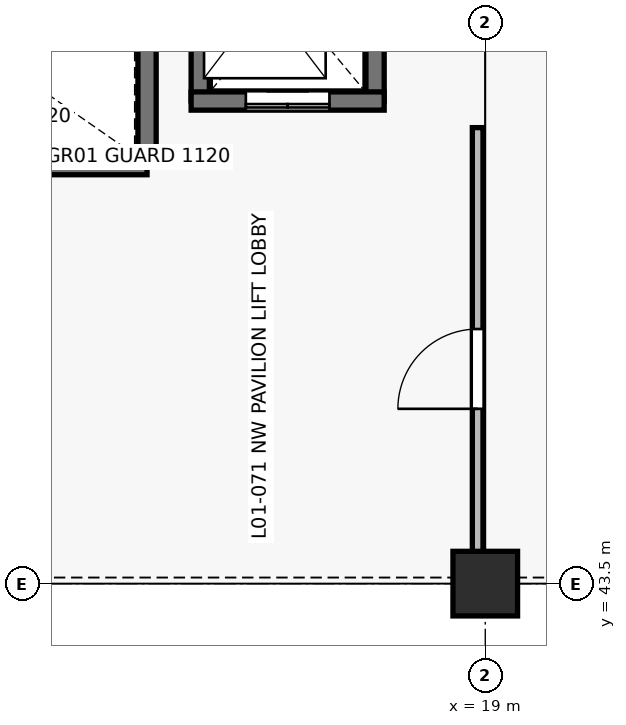
"""IFC4 building model, lengths in metres.
Left out: names, types, materials, properties, quantities, classifications, styles, units other than length and angle.
Written with IfcOpenShell. Run it as: python <this file> out.ifc"""

import sys

from ifc_helpers import new_model, si_unit, direction, frame, frame_2d, origin, origin_2d, place, context, subcontext, project, spatial, rectangle, extrude, element, fill, save


model = new_model("IFC4")
c1 = context("Model", 3, precision=1e-05, world=origin(), true_north=direction((0.0, 1.0)))
c2 = subcontext(c1, "Body", "Model", "MODEL_VIEW")
j1 = project(units=[si_unit("LENGTHUNIT", "METRE"), si_unit("PLANEANGLEUNIT", "RADIAN")], contexts=[c1])
p1 = place(None, origin())
s1 = spatial("IfcSite", under=j1, at=p1, CompositionType="ELEMENT")
p2 = place(p1, origin())
s2 = spatial("IfcBuilding", under=s1, at=p2, CompositionType="ELEMENT")
p3 = place(p2, frame((0.0, 0.0, 4.8)))
s3 = spatial("IfcBuildingStorey", under=s2, at=p3, CompositionType="ELEMENT", Elevation=4.8)
p4 = place(p3, frame((19.0, 43.5, 0.0), z_axis=(0.0, 0.0, 1.0), x_axis=(1.0, 0.0, 0.0)))
e1 = element("IfcColumn", 1, at=p4, inside=s3, PredefinedType="COLUMN", context=c2, shape_type="SweptSolid", body=[
    extrude(rectangle(XDim=0.85, YDim=0.85, at=origin_2d()), origin(), (0.0, 0.0, 1.0), 4.2),
])
for number, where, z_axis, x_axis in (
    (2, (15.25, 49.85, 0.0), (0.0, 0.0, 1.0), (0.0, 1.0, 0.0)),
    (3, (17.55, 52.55, 0.0), (0.0, 0.0, 1.0), (0.0, -1.0, 0.0)),
):
    element("IfcWall", number, at=place(p3, frame(where, z_axis=z_axis, x_axis=x_axis)), inside=s3, PredefinedType="SHEAR", context=c2, shape_type="SweptSolid", body=[
        extrude(rectangle(XDim=2.7, YDim=0.24, at=frame_2d((1.35, 0.0))), origin(), (0.0, 0.0, 1.0), 4.2),
    ])
p5 = place(p3, frame((17.67, 49.85, 0.0), z_axis=(0.0, 0.0, 1.0), x_axis=(-1.0, 0.0, 0.0)))
e4 = element("IfcWall", 4, at=p5, inside=s3, PredefinedType="SHEAR", context=c2, shape_type="SweptSolid", body=[
    extrude(rectangle(XDim=2.54, YDim=0.24, at=frame_2d((1.27, 0.0))), origin(), (0.0, 0.0, 1.0), 4.2),
])
p6 = place(p5, frame((0.72, 0.0, 0.0)))
e5 = element("IfcOpeningElement", 5, at=p6, cuts=e4, PredefinedType="OPENING", context=c2, shape_type="SweptSolid", body=[
    extrude(rectangle(XDim=1.1, YDim=2.15, at=frame_2d((0.55, 1.075))), frame((0.0, 0.13, 0.0), z_axis=(0.0, -1.0, 0.0), x_axis=(1.0, 0.0, 0.0)), (0.0, 0.0, 1.0), 0.26),
])
p7 = place(p3, frame((14.55, 49.0, 0.0), z_axis=(0.0, 0.0, 1.0), x_axis=(0.0, 1.0, 0.0)))
e6 = element("IfcWall", 6, at=p7, inside=s3, PredefinedType="SHEAR", context=c2, shape_type="SweptSolid", body=[
    extrude(rectangle(XDim=4.0, YDim=0.24, at=frame_2d((2.0, 0.0))), origin(), (0.0, 0.0, 1.0), 4.2),
])
p8 = place(p3, frame((7.45, 49.0, 0.0), z_axis=(0.0, 0.0, 1.0), x_axis=(1.0, 0.0, 0.0)))
e7 = element("IfcWall", 7, at=p8, inside=s3, PredefinedType="SHEAR", context=c2, shape_type="SweptSolid", body=[
    extrude(rectangle(XDim=7.1, YDim=0.24, at=frame_2d((3.55, 0.0))), origin(), (0.0, 0.0, 1.0), 4.2),
])
p9 = place(p8, frame((0.18, 0.0, 0.0)))
e8 = element("IfcOpeningElement", 8, at=p9, cuts=e7, PredefinedType="OPENING", context=c2, shape_type="SweptSolid", body=[
    extrude(rectangle(XDim=1.0, YDim=2.15, at=frame_2d((0.5, 1.075))), frame((0.0, 0.13, 0.0), z_axis=(0.0, -1.0, 0.0), x_axis=(1.0, 0.0, 0.0)), (0.0, 0.0, 1.0), 0.26),
])
p10 = place(p3, frame((18.9, 43.6, 0.0), z_axis=(0.0, 0.0, 1.0), x_axis=(0.0, 1.0, 0.0)))
e9 = element("IfcWall", 9, at=p10, inside=s3, PredefinedType="PARTITIONING", context=c2, shape_type="SweptSolid", body=[
    extrude(rectangle(XDim=5.9, YDim=0.14, at=frame_2d((2.95, 0.0))), origin(), (0.0, 0.0, 1.0), 2.475),
])
p11 = place(p10, frame((2.2, 0.0, 0.0)))
e10 = element("IfcOpeningElement", 10, at=p11, cuts=e9, PredefinedType="OPENING", context=c2, shape_type="SweptSolid", body=[
    extrude(rectangle(XDim=1.05, YDim=2.1, at=frame_2d((0.525, 1.05))), frame((0.0, 0.08, 0.0), z_axis=(0.0, -1.0, 0.0), x_axis=(1.0, 0.0, 0.0)), (0.0, 0.0, 1.0), 0.16),
])
p12 = place(p6, origin())
e11 = element("IfcDoor", 11, at=p12, inside=s3, OperationType="DOUBLE_DOOR_SLIDING", PredefinedType="USERDEFINED", context=c2, shape_type="SweptSolid", body=[
    extrude(rectangle(XDim=1.1, YDim=2.15, at=frame_2d((0.55, 1.075))), frame((0.0, 0.025, 0.0), z_axis=(0.0, -1.0, 0.0), x_axis=(1.0, 0.0, 0.0)), (0.0, 0.0, 1.0), 0.05),
])
fill(e5, e11)
p13 = place(p11, origin())
e12 = element("IfcDoor", 12, at=p13, inside=s3, OperationType="SINGLE_SWING_LEFT", PredefinedType="DOOR", context=c2, shape_type="SweptSolid", body=[
    extrude(rectangle(XDim=1.05, YDim=2.1, at=frame_2d((0.525, 1.05))), frame((0.0, 0.025, 0.0), z_axis=(0.0, -1.0, 0.0), x_axis=(1.0, 0.0, 0.0)), (0.0, 0.0, 1.0), 0.05),
])
fill(e10, e12)
save(model, sys.argv[1])
